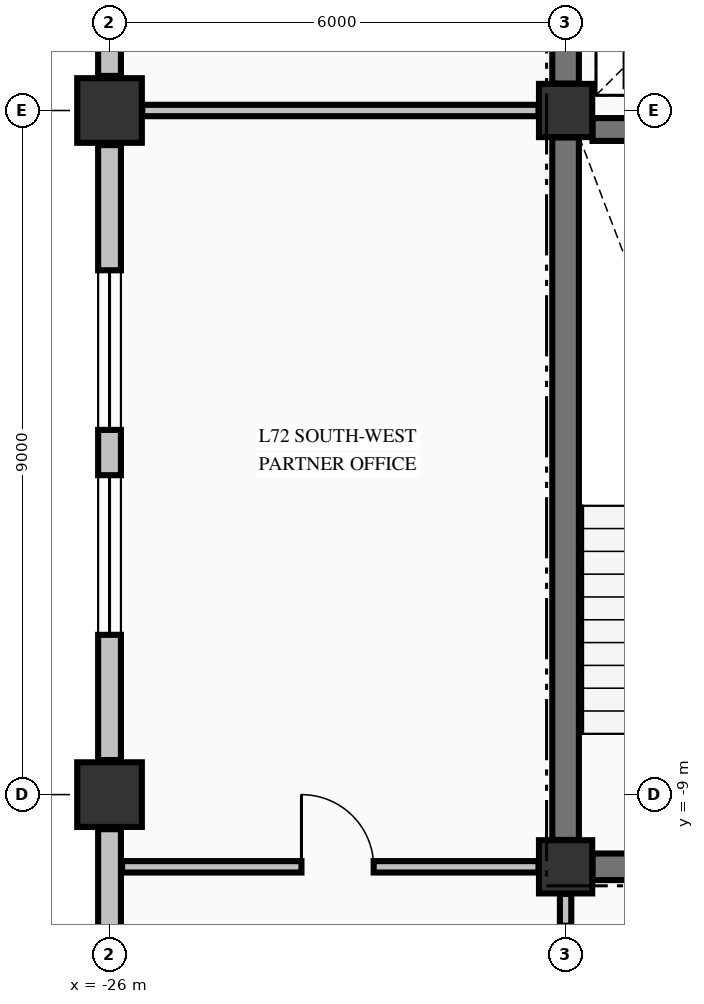
"""IFC4 building model, lengths in metres.
Left out: names, types, materials, properties, quantities, classifications, styles, units other than length and angle.
Written with IfcOpenShell. Run it as: python <this file> out.ifc"""

import sys

from ifc_helpers import new_model, si_unit, direction, frame, frame_2d, origin, origin_2d, place, context, subcontext, project, spatial, rectangle, extrude, element, fill, save


model = new_model("IFC4")
c1 = context("Model", 3, precision=1e-05, world=origin(), true_north=direction((0.0, 1.0)))
c2 = subcontext(c1, "Body", "Model", "MODEL_VIEW")
j1 = project(units=[si_unit("LENGTHUNIT", "METRE"), si_unit("PLANEANGLEUNIT", "RADIAN")], contexts=[c1])
p1 = place(None, origin())
s1 = spatial("IfcSite", under=j1, at=p1, CompositionType="ELEMENT")
p2 = place(p1, origin())
s2 = spatial("IfcBuilding", under=s1, at=p2, CompositionType="ELEMENT")
p3 = place(p2, frame((0.0, 0.0, 270.58)))
s3 = spatial("IfcBuildingStorey", under=s2, at=p3, CompositionType="ELEMENT", Elevation=270.58)
for number, where, z_axis, x_axis in (
    (1, (-26.0, -9.0, -0.325), (0.0, 0.0, 1.0), (1.0, 0.0, 0.0)),
    (2, (-26.0, 0.0, -0.325), (0.0, 0.0, 1.0), (1.0, 0.0, 0.0)),
):
    element("IfcColumn", number, at=place(p3, frame(where, z_axis=z_axis, x_axis=x_axis)), inside=s3, PredefinedType="COLUMN", context=c2, shape_type="SweptSolid", body=[
        extrude(rectangle(XDim=0.85, YDim=0.85, at=origin_2d()), origin(), (0.0, 0.0, 1.0), 3.815),
    ])
for number, where, z_axis, x_axis in (
    (3, (-20.0, -9.95, -0.325), (0.0, 0.0, 1.0), (1.0, 0.0, 0.0)),
    (4, (-20.0, 0.0, -0.325), (0.0, 0.0, 1.0), (1.0, 0.0, 0.0)),
):
    element("IfcColumn", number, at=place(p3, frame(where, z_axis=z_axis, x_axis=x_axis)), inside=s3, PredefinedType="COLUMN", context=c2, shape_type="SweptSolid", body=[
        extrude(rectangle(XDim=0.7, YDim=0.7, at=origin_2d()), origin(), (0.0, 0.0, 1.0), 3.815),
    ])
p4 = place(p3, frame((-26.0, -9.455, 0.0), z_axis=(0.0, 0.0, 1.0), x_axis=(0.0, -1.0, 0.0)))
e5 = element("IfcWall", 5, at=p4, inside=s3, PredefinedType="STANDARD", context=c2, shape_type="SweptSolid", body=[
    extrude(rectangle(XDim=8.09, YDim=0.3, at=frame_2d((4.045, 0.0))), origin(), (0.0, 0.0, 1.0), 2.882),
])
p5 = place(p3, frame((-26.0, -0.455, 0.0), z_axis=(0.0, 0.0, 1.0), x_axis=(0.0, -1.0, 0.0)))
e6 = element("IfcWall", 6, at=p5, inside=s3, PredefinedType="STANDARD", context=c2, shape_type="SweptSolid", body=[
    extrude(rectangle(XDim=8.09, YDim=0.3, at=frame_2d((4.045, 0.0))), origin(), (0.0, 0.0, 1.0), 2.882),
])
p6 = place(p5, frame((1.647, 0.0, 0.7)))
e7 = element("IfcOpeningElement", 7, at=p6, cuts=e6, PredefinedType="OPENING", context=c2, shape_type="SweptSolid", body=[
    extrude(rectangle(XDim=2.1, YDim=1.5, at=frame_2d((1.05, 0.75))), frame((0.0, 0.16, 0.0), z_axis=(0.0, -1.0, 0.0), x_axis=(1.0, 0.0, 0.0)), (0.0, 0.0, 1.0), 0.32),
])
p7 = place(p5, frame((4.343, 0.0, 0.7)))
e8 = element("IfcOpeningElement", 8, at=p7, cuts=e6, PredefinedType="OPENING", context=c2, shape_type="SweptSolid", body=[
    extrude(rectangle(XDim=2.1, YDim=1.5, at=frame_2d((1.05, 0.75))), frame((0.0, 0.16, 0.0), z_axis=(0.0, -1.0, 0.0), x_axis=(1.0, 0.0, 0.0)), (0.0, 0.0, 1.0), 0.32),
])
p8 = place(p3, frame((-26.0, 8.545, 0.0), z_axis=(0.0, 0.0, 1.0), x_axis=(0.0, -1.0, 0.0)))
e9 = element("IfcWall", 9, at=p8, inside=s3, PredefinedType="STANDARD", context=c2, shape_type="SweptSolid", body=[
    extrude(rectangle(XDim=8.09, YDim=0.3, at=frame_2d((4.045, 0.0))), origin(), (0.0, 0.0, 1.0), 2.882),
])
p9 = place(p8, frame((1.647, 0.0, 0.7)))
e10 = element("IfcOpeningElement", 10, at=p9, cuts=e9, PredefinedType="OPENING", context=c2, shape_type="SweptSolid", body=[
    extrude(rectangle(XDim=2.1, YDim=1.5, at=frame_2d((1.05, 0.75))), frame((0.0, 0.16, 0.0), z_axis=(0.0, -1.0, 0.0), x_axis=(1.0, 0.0, 0.0)), (0.0, 0.0, 1.0), 0.32),
])
p10 = place(p8, frame((4.343, 0.0, 0.7)))
e11 = element("IfcOpeningElement", 11, at=p10, cuts=e9, PredefinedType="OPENING", context=c2, shape_type="SweptSolid", body=[
    extrude(rectangle(XDim=2.1, YDim=1.5, at=frame_2d((1.05, 0.75))), frame((0.0, 0.16, 0.0), z_axis=(0.0, -1.0, 0.0), x_axis=(1.0, 0.0, 0.0)), (0.0, 0.0, 1.0), 0.32),
])
p11 = place(p3, frame((-19.646, -9.95, 0.0), z_axis=(0.0, 0.0, 1.0), x_axis=(1.0, 0.0, 0.0)))
e12 = element("IfcWall", 12, at=p11, inside=s3, PredefinedType="SHEAR", context=c2, shape_type="SweptSolid", body=[
    extrude(rectangle(XDim=4.946, YDim=0.35, at=frame_2d((2.473, 0.0))), origin(), (0.0, 0.0, 1.0), 3.49),
])
p12 = place(p11, frame((0.821, 0.0, 0.0)))
e13 = element("IfcOpeningElement", 13, at=p12, cuts=e12, PredefinedType="OPENING", context=c2, shape_type="SweptSolid", body=[
    extrude(rectangle(XDim=1.05, YDim=2.15, at=frame_2d((0.525, 1.075))), frame((0.0, 0.185, 0.0), z_axis=(0.0, -1.0, 0.0), x_axis=(1.0, 0.0, 0.0)), (0.0, 0.0, 1.0), 0.37),
])
p13 = place(p3, frame((-19.646, -0.25, 0.0), z_axis=(0.0, 0.0, 1.0), x_axis=(1.0, 0.0, 0.0)))
e14 = element("IfcWall", 14, at=p13, inside=s3, PredefinedType="SHEAR", context=c2, shape_type="SweptSolid", body=[
    extrude(rectangle(XDim=8.292, YDim=0.3, at=frame_2d((4.146, 0.0))), origin(), (0.0, 0.0, 1.0), 3.49),
])
p14 = place(p13, frame((5.946, 0.0, 0.0)))
e15 = element("IfcOpeningElement", 15, at=p14, cuts=e14, PredefinedType="OPENING", context=c2, shape_type="SweptSolid", body=[
    extrude(rectangle(XDim=1.1, YDim=2.15, at=frame_2d((0.55, 1.075))), frame((0.0, 0.16, 0.0), z_axis=(0.0, -1.0, 0.0), x_axis=(1.0, 0.0, 0.0)), (0.0, 0.0, 1.0), 0.32),
])
p15 = place(p3, frame((-25.835, -9.95, 0.0), z_axis=(0.0, 0.0, 1.0), x_axis=(1.0, 0.0, 0.0)))
e16 = element("IfcWall", 16, at=p15, inside=s3, PredefinedType="PARTITIONING", context=c2, shape_type="SweptSolid", body=[
    extrude(rectangle(XDim=5.479, YDim=0.15, at=frame_2d((2.74, 0.0))), origin(), (0.0, 0.0, 1.0), 3.49),
])
p16 = place(p15, frame((2.36, 0.0, 0.0)))
e17 = element("IfcOpeningElement", 17, at=p16, cuts=e16, PredefinedType="OPENING", context=c2, shape_type="SweptSolid", body=[
    extrude(rectangle(XDim=0.95, YDim=2.15, at=frame_2d((0.475, 1.075))), frame((0.0, 0.085, 0.0), z_axis=(0.0, -1.0, 0.0), x_axis=(1.0, 0.0, 0.0)), (0.0, 0.0, 1.0), 0.17),
])
p17 = place(p3, frame((-25.569, 0.0, 0.0), z_axis=(0.0, 0.0, 1.0), x_axis=(1.0, 0.0, 0.0)))
e18 = element("IfcWall", 18, at=p17, inside=s3, PredefinedType="PARTITIONING", context=c2, shape_type="SweptSolid", body=[
    extrude(rectangle(XDim=5.213, YDim=0.15, at=frame_2d((2.606, 0.0))), origin(), (0.0, 0.0, 1.0), 3.08),
])
p18 = place(p3, frame((-20.0, -9.596, 0.0), z_axis=(0.0, 0.0, 1.0), x_axis=(0.0, 1.0, 0.0)))
e19 = element("IfcWall", 19, at=p18, inside=s3, PredefinedType="SHEAR", context=c2, shape_type="SweptSolid", body=[
    extrude(rectangle(XDim=9.242, YDim=0.35, at=frame_2d((4.621, 0.0))), origin(), (0.0, 0.0, 1.0), 3.49),
])
p19 = place(p3, frame((-20.0, 0.354, 0.0), z_axis=(0.0, 0.0, 1.0), x_axis=(0.0, 1.0, 0.0)))
e20 = element("IfcWall", 20, at=p19, inside=s3, PredefinedType="SHEAR", context=c2, shape_type="SweptSolid", body=[
    extrude(rectangle(XDim=2.169, YDim=0.35, at=frame_2d((1.084, 0.0))), origin(), (0.0, 0.0, 1.0), 3.49),
])
p20 = place(p3, frame((-20.0, -12.372, 0.0), z_axis=(0.0, 0.0, 1.0), x_axis=(0.0, 1.0, 0.0)))
e21 = element("IfcWall", 21, at=p20, inside=s3, PredefinedType="PARTITIONING", context=c2, shape_type="SweptSolid", body=[
    extrude(rectangle(XDim=2.066, YDim=0.15, at=frame_2d((1.033, 0.0))), origin(), (0.0, 0.0, 1.0), 3.49),
])
p21 = place(p20, frame((0.697, 0.0, 0.0)))
e22 = element("IfcOpeningElement", 22, at=p21, cuts=e21, PredefinedType="OPENING", context=c2, shape_type="SweptSolid", body=[
    extrude(rectangle(XDim=0.95, YDim=2.15, at=frame_2d((0.475, 1.075))), frame((0.0, 0.085, 0.0), z_axis=(0.0, -1.0, 0.0), x_axis=(1.0, 0.0, 0.0)), (0.0, 0.0, 1.0), 0.17),
])
p22 = place(p6, origin())
e23 = element("IfcWindow", 23, at=p22, inside=s3, PartitioningType="SINGLE_PANEL", PredefinedType="WINDOW", context=c2, shape_type="SweptSolid", body=[
    extrude(rectangle(XDim=2.1, YDim=1.5, at=frame_2d((1.05, 0.75))), frame((0.0, 0.03, 0.0), z_axis=(0.0, -1.0, 0.0), x_axis=(1.0, 0.0, 0.0)), (0.0, 0.0, 1.0), 0.06),
])
fill(e7, e23)
p23 = place(p7, origin())
e24 = element("IfcWindow", 24, at=p23, inside=s3, PartitioningType="SINGLE_PANEL", PredefinedType="WINDOW", context=c2, shape_type="SweptSolid", body=[
    extrude(rectangle(XDim=2.1, YDim=1.5, at=frame_2d((1.05, 0.75))), frame((0.0, 0.03, 0.0), z_axis=(0.0, -1.0, 0.0), x_axis=(1.0, 0.0, 0.0)), (0.0, 0.0, 1.0), 0.06),
])
fill(e8, e24)
p24 = place(p16, origin())
e25 = element("IfcDoor", 25, at=p24, inside=s3, OperationType="SINGLE_SWING_LEFT", PredefinedType="DOOR", context=c2, shape_type="SweptSolid", body=[
    extrude(rectangle(XDim=0.95, YDim=2.15, at=frame_2d((0.475, 1.075))), frame((0.0, 0.025, 0.0), z_axis=(0.0, -1.0, 0.0), x_axis=(1.0, 0.0, 0.0)), (0.0, 0.0, 1.0), 0.05),
])
fill(e17, e25)
save(model, sys.argv[1])
